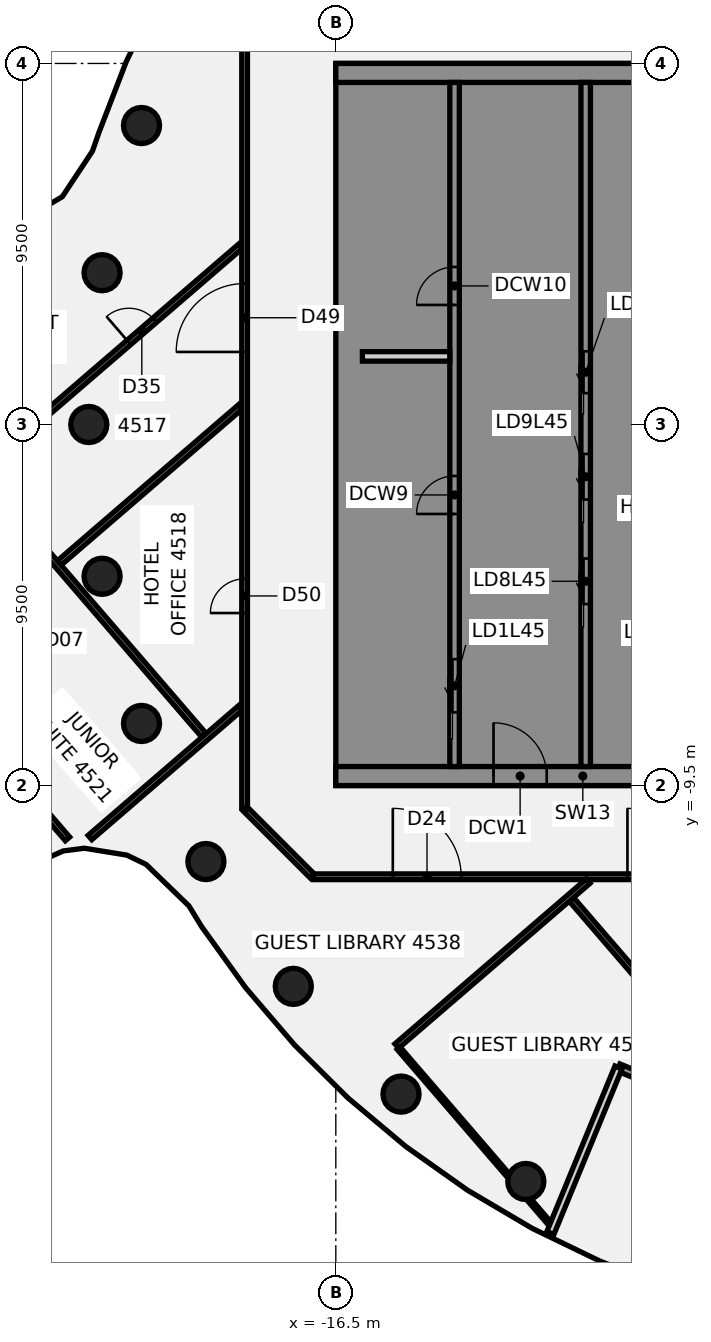
"""IFC4 building model, lengths in metres.
Left out: names, types, materials, properties, quantities, classifications, styles, units other than length and angle.
Written with IfcOpenShell. Run it as: python <this file> out.ifc"""

import sys

from ifc_helpers import new_model, si_unit, direction, frame, frame_2d, origin, origin_2d, place, context, subcontext, project, spatial, polyline, rectangle, circle, outline, extrude, element, fill, save


model = new_model("IFC4")
c1 = context("Model", 3, precision=1e-05, world=origin(), true_north=direction((0.0, 1.0)))
c2 = subcontext(c1, "Body", "Model", "MODEL_VIEW")
j1 = project(units=[si_unit("LENGTHUNIT", "METRE"), si_unit("PLANEANGLEUNIT", "RADIAN")], contexts=[c1])
p1 = place(None, origin())
s1 = spatial("IfcSite", under=j1, at=p1, CompositionType="ELEMENT")
p2 = place(p1, origin())
s2 = spatial("IfcBuilding", under=s1, at=p2, CompositionType="ELEMENT")
p3 = place(p2, frame((0.0, 0.0, 182.5)))
s3 = spatial("IfcBuildingStorey", under=s2, at=p3, CompositionType="ELEMENT", Elevation=182.5)
for number, where, z_axis, x_axis in (
    (1, (-21.613, 7.866, -0.14), (0.0, 0.0, 1.0), (1.0, 0.0, 0.0)),
    (2, (-22.651, 3.994, -0.14), (0.0, 0.0, 1.0), (1.0, 0.0, 0.0)),
    (3, (-23.0, 0.0, -0.14), (0.0, 0.0, 1.0), (1.0, 0.0, 0.0)),
    (4, (-22.651, -3.994, -0.14), (0.0, 0.0, 1.0), (1.0, 0.0, 0.0)),
    (5, (-21.613, -7.866, -0.14), (0.0, 0.0, 1.0), (1.0, 0.0, 0.0)),
    (6, (-19.919, -11.5, -0.14), (0.0, 0.0, 1.0), (1.0, 0.0, 0.0)),
    (7, (-17.619, -14.784, -0.14), (0.0, 0.0, 1.0), (1.0, 0.0, 0.0)),
    (8, (-14.784, -17.619, -0.14), (0.0, 0.0, 1.0), (1.0, 0.0, 0.0)),
    (9, (-11.5, -19.919, -0.14), (0.0, 0.0, 1.0), (1.0, 0.0, 0.0)),
):
    element("IfcColumn", number, at=place(p3, frame(where, z_axis=z_axis, x_axis=x_axis)), inside=s3, PredefinedType="COLUMN", context=c2, shape_type="SweptSolid", body=[
        extrude(circle(Radius=0.475, at=origin_2d()), origin(), (0.0, 0.0, 1.0), 3.6),
    ])
p4 = place(p3, frame((-24.698, -9.584, -0.135), z_axis=(0.048576320124, -0.013229584391, 0.998731855515), x_axis=(-0.651247732409, 0.757717932984, 0.04171240903)))
e10 = element("IfcColumn", 10, at=p4, inside=s3, PredefinedType="COLUMN", context=c2, shape_type="SweptSolid", body=[
    extrude(rectangle(XDim=0.9, YDim=0.9, at=origin_2d()), origin(), (0.0, 0.0, 1.0), 3.599),
])
p5 = place(p3, frame((-29.251, 2.595, 0.0), z_axis=(0.0, 0.0, 1.0), x_axis=(0.652713725704, -0.757604641141, 0.0)))
e11 = element("IfcWall", 11, at=p5, inside=s3, PredefinedType="PARTITIONING", context=c2, shape_type="SweptSolid", body=[
    extrude(rectangle(XDim=14.219, YDim=0.15, at=frame_2d((7.109, 0.0))), origin(), (0.0, 0.0, 1.0), 2.864),
])
p6 = place(p5, frame((5.799, 0.0, 0.0)))
e12 = element("IfcOpeningElement", 12, at=p6, cuts=e11, PredefinedType="OPENING", context=c2, shape_type="SweptSolid", body=[
    extrude(rectangle(XDim=1.4, YDim=2.1, at=frame_2d((0.7, 1.05))), frame((0.0, 0.085, 0.0), z_axis=(0.0, -1.0, 0.0), x_axis=(1.0, 0.0, 0.0)), (0.0, 0.0, 1.0), 0.17),
])
p7 = place(p3, frame((-24.299, -10.048, 0.0), z_axis=(0.0, 0.0, 1.0), x_axis=(0.652995188074, -0.75736205632, 0.0)))
e13 = element("IfcWall", 13, at=p7, inside=s3, PredefinedType="PARTITIONING", context=c2, shape_type="SweptSolid", body=[
    extrude(rectangle(XDim=1.13, YDim=0.15, at=frame_2d((0.565, 0.0))), origin(), (0.0, 0.0, 1.0), 2.864),
])
p8 = place(p3, frame((-14.847, -16.411, 0.0), z_axis=(0.0, 0.0, 1.0), x_axis=(0.652680882715, -0.757632935753, 0.0)))
e14 = element("IfcWall", 14, at=p8, inside=s3, PredefinedType="PARTITIONING", context=c2, shape_type="SweptSolid", body=[
    extrude(rectangle(XDim=4.443, YDim=0.1, at=frame_2d((2.222, 0.0))), origin(), (0.0, 0.0, 1.0), 2.864),
])
p9 = place(p3, frame((-11.425, -20.383, 0.0), z_axis=(0.0, 0.0, 1.0), x_axis=(0.652545214722, -0.757749789009, 0.0)))
e15 = element("IfcWall", 15, at=p9, inside=s3, PredefinedType="PARTITIONING", context=c2, shape_type="SweptSolid", body=[
    extrude(rectangle(XDim=0.882, YDim=0.1, at=frame_2d((0.441, 0.0))), origin(), (0.0, 0.0, 1.0), 2.864),
])
p10 = place(p3, frame((-10.298, -12.499, 0.0), z_axis=(0.0, 0.0, 1.0), x_axis=(0.652713185698, -0.757605106382, 0.0)))
e16 = element("IfcWall", 16, at=p10, inside=s3, PredefinedType="PARTITIONING", context=c2, shape_type="SweptSolid", body=[
    extrude(rectangle(XDim=17.62, YDim=0.15, at=frame_2d((8.81, 0.0))), origin(), (0.0, 0.0, 1.0), 2.864),
])
p11 = place(p10, frame((8.22, 0.0, 0.0)))
e17 = element("IfcOpeningElement", 17, at=p11, cuts=e16, PredefinedType="OPENING", context=c2, shape_type="SweptSolid", body=[
    extrude(rectangle(XDim=1.8, YDim=2.1, at=frame_2d((0.9, 1.05))), frame((0.0, 0.085, 0.0), z_axis=(0.0, -1.0, 0.0), x_axis=(1.0, 0.0, 0.0)), (0.0, 0.0, 1.0), 0.17),
])
p12 = place(p3, frame((-18.872, -10.128, 0.0), z_axis=(0.0, 0.0, 1.0), x_axis=(0.707106781187, -0.707106781187, 0.0)))
e18 = element("IfcWall", 18, at=p12, inside=s3, PredefinedType="PARTITIONING", context=c2, shape_type="SweptSolid", body=[
    extrude(rectangle(XDim=2.465, YDim=0.15, at=frame_2d((1.232, 0.0))), origin(), (0.0, 0.0, 1.0), 2.864),
])
p13 = place(p3, frame((-17.1, -11.9, 0.0), z_axis=(0.0, 0.0, 1.0), x_axis=(1.0, 0.0, 0.0)))
e19 = element("IfcWall", 19, at=p13, inside=s3, PredefinedType="PARTITIONING", context=c2, shape_type="SweptSolid", body=[
    extrude(rectangle(XDim=34.165, YDim=0.15, at=frame_2d((17.083, 0.0))), origin(), (0.0, 0.0, 1.0), 2.864),
])
p14 = place(p13, frame((8.274, 0.0, 0.0)))
e20 = element("IfcOpeningElement", 20, at=p14, cuts=e19, PredefinedType="OPENING", context=c2, shape_type="SweptSolid", body=[
    extrude(rectangle(XDim=1.8, YDim=2.1, at=frame_2d((0.9, 1.05))), frame((0.0, 0.085, 0.0), z_axis=(0.0, -1.0, 0.0), x_axis=(1.0, 0.0, 0.0)), (0.0, 0.0, 1.0), 0.17),
])
p15 = place(p13, frame((2.1, 0.0, 0.0)))
e21 = element("IfcOpeningElement", 21, at=p15, cuts=e19, PredefinedType="OPENING", context=c2, shape_type="SweptSolid", body=[
    extrude(rectangle(XDim=1.8, YDim=2.1, at=frame_2d((0.9, 1.05))), frame((0.0, 0.085, 0.0), z_axis=(0.0, -1.0, 0.0), x_axis=(1.0, 0.0, 0.0)), (0.0, 0.0, 1.0), 0.17),
])
p16 = place(p13, frame((25.33, 0.0, 0.0)))
e22 = element("IfcOpeningElement", 22, at=p16, cuts=e19, PredefinedType="OPENING", context=c2, shape_type="SweptSolid", body=[
    extrude(rectangle(XDim=1.8, YDim=2.1, at=frame_2d((0.9, 1.05))), frame((0.0, 0.085, 0.0), z_axis=(0.0, -1.0, 0.0), x_axis=(1.0, 0.0, 0.0)), (0.0, 0.0, 1.0), 0.17),
])
p17 = place(p3, frame((-25.862, -1.216, 0.0), z_axis=(0.0, 0.0, 1.0), x_axis=(0.757576468923, 0.652746423762, 0.0)))
e23 = element("IfcWall", 23, at=p17, inside=s3, PredefinedType="PARTITIONING", context=c2, shape_type="SweptSolid", body=[
    extrude(rectangle(XDim=9.05, YDim=0.15, at=frame_2d((4.525, 0.0))), origin(), (0.0, 0.0, 1.0), 2.864),
])
p18 = place(p17, frame((5.17, 0.0, 0.0)))
e24 = element("IfcOpeningElement", 24, at=p18, cuts=e23, PredefinedType="OPENING", context=c2, shape_type="SweptSolid", body=[
    extrude(rectangle(XDim=0.9, YDim=2.1, at=frame_2d((0.45, 1.05))), frame((0.0, 0.085, 0.0), z_axis=(0.0, -1.0, 0.0), x_axis=(1.0, 0.0, 0.0)), (0.0, 0.0, 1.0), 0.17),
])
p19 = place(p3, frame((-23.774, -3.641, 0.0), z_axis=(0.0, 0.0, 1.0), x_axis=(0.757583902186, 0.65273779663, 0.0)))
e25 = element("IfcWall", 25, at=p19, inside=s3, PredefinedType="PARTITIONING", context=c2, shape_type="SweptSolid", body=[
    extrude(rectangle(XDim=6.294, YDim=0.15, at=frame_2d((3.147, 0.0))), origin(), (0.0, 0.0, 1.0), 2.864),
])
p20 = place(p3, frame((-22.97, -10.868, 0.0), z_axis=(0.0, 0.0, 1.0), x_axis=(0.75753804944, 0.6527910107, 0.0)))
e26 = element("IfcWall", 26, at=p20, inside=s3, PredefinedType="PARTITIONING", context=c2, shape_type="SweptSolid", body=[
    extrude(rectangle(XDim=5.233, YDim=0.15, at=frame_2d((2.616, 0.0))), origin(), (0.0, 0.0, 1.0), 2.864),
])
p21 = place(p3, frame((-14.896, -16.354, 0.0), z_axis=(0.0, 0.0, 1.0), x_axis=(0.757644724188, 0.652667198432, 0.0)))
e27 = element("IfcWall", 27, at=p21, inside=s3, PredefinedType="PARTITIONING", context=c2, shape_type="SweptSolid", body=[
    extrude(rectangle(XDim=6.649, YDim=0.15, at=frame_2d((3.324, 0.0))), origin(), (0.0, 0.0, 1.0), 2.864),
])
p22 = place(p3, frame((-18.9, -10.1, 0.0), z_axis=(0.0, 0.0, 1.0), x_axis=(0.0, 1.0, 0.0)))
e28 = element("IfcWall", 28, at=p22, inside=s3, PredefinedType="PARTITIONING", context=c2, shape_type="SweptSolid", body=[
    extrude(rectangle(XDim=20.2, YDim=0.15, at=frame_2d((10.1, 0.0))), origin(), (0.0, 0.0, 1.0), 2.864),
])
p23 = place(p22, frame((12.009, 0.0, 0.0)))
e29 = element("IfcOpeningElement", 29, at=p23, cuts=e28, PredefinedType="OPENING", context=c2, shape_type="SweptSolid", body=[
    extrude(rectangle(XDim=1.8, YDim=2.1, at=frame_2d((0.9, 1.05))), frame((0.0, 0.085, 0.0), z_axis=(0.0, -1.0, 0.0), x_axis=(1.0, 0.0, 0.0)), (0.0, 0.0, 1.0), 0.17),
])
p24 = place(p22, frame((5.139, 0.0, 0.0)))
e30 = element("IfcOpeningElement", 30, at=p24, cuts=e28, PredefinedType="OPENING", context=c2, shape_type="SweptSolid", body=[
    extrude(rectangle(XDim=0.9, YDim=2.1, at=frame_2d((0.45, 1.05))), frame((0.0, 0.085, 0.0), z_axis=(0.0, -1.0, 0.0), x_axis=(1.0, 0.0, 0.0)), (0.0, 0.0, 1.0), 0.17),
])
p25 = place(p3, frame((-9.062, -16.918, 0.0), z_axis=(0.0, 0.0, 1.0), x_axis=(0.924739730044, -0.380600094164, 0.0)))
e31 = element("IfcWall", 31, at=p25, inside=s3, PredefinedType="SOLIDWALL", context=c2, shape_type="SweptSolid", body=[
    extrude(rectangle(XDim=4.347, YDim=0.2, at=frame_2d((2.174, 0.0))), origin(), (0.0, 0.0, 1.0), 3.46),
])
p26 = place(p25, frame((1.273, 0.0, 0.0)))
e32 = element("IfcOpeningElement", 32, at=p26, cuts=e31, PredefinedType="OPENING", context=c2, shape_type="SweptSolid", body=[
    extrude(rectangle(XDim=1.8, YDim=2.4, at=frame_2d((0.9, 1.2))), frame((0.0, 0.11, 0.0), z_axis=(0.0, -1.0, 0.0), x_axis=(1.0, 0.0, 0.0)), (0.0, 0.0, 1.0), 0.22),
])
p27 = place(p3, frame((-9.062, -16.918, 0.0), z_axis=(0.0, 0.0, 1.0), x_axis=(-0.380580288667, -0.924747881251, 0.0)))
e33 = element("IfcWall", 33, at=p27, inside=s3, PredefinedType="SOLIDWALL", context=c2, shape_type="SweptSolid", body=[
    extrude(rectangle(XDim=4.708, YDim=0.2, at=frame_2d((2.354, 0.0))), origin(), (0.0, 0.0, 1.0), 3.46),
])
p28 = place(p3, frame((-16.5, -9.25, 0.0), z_axis=(0.0, 0.0, 1.0), x_axis=(1.0, 0.0, 0.0)))
e34 = element("IfcWall", 34, at=p28, inside=s3, PredefinedType="SHEAR", context=c2, shape_type="SweptSolid", body=[
    extrude(rectangle(XDim=13.0, YDim=0.5, at=frame_2d((6.5, 0.0))), origin(), (0.0, 0.0, 1.0), 3.46),
])
p29 = place(p28, frame((4.15, 0.0, 0.0)))
e35 = element("IfcOpeningElement", 35, at=p29, cuts=e34, PredefinedType="OPENING", context=c2, shape_type="SweptSolid", body=[
    extrude(rectangle(XDim=1.4, YDim=2.1, at=frame_2d((0.7, 1.05))), frame((0.0, 0.26, 0.0), z_axis=(0.0, -1.0, 0.0), x_axis=(1.0, 0.0, 0.0)), (0.0, 0.0, 1.0), 0.52),
])
p30 = place(p28, frame((10.125, 0.0, 0.0)))
e36 = element("IfcOpeningElement", 36, at=p30, cuts=e34, PredefinedType="OPENING", context=c2, shape_type="SweptSolid", body=[
    extrude(rectangle(XDim=1.4, YDim=2.1, at=frame_2d((0.7, 1.05))), frame((0.0, 0.26, 0.0), z_axis=(0.0, -1.0, 0.0), x_axis=(1.0, 0.0, 0.0)), (0.0, 0.0, 1.0), 0.52),
])
p31 = place(p3, origin())
e37 = element("IfcWall", 37, at=p31, inside=s3, PredefinedType="SHEAR", context=c2, shape_type="SweptSolid", body=[
    extrude(outline(polyline([(-13.5, -8.125), (-16.0, -8.125), (-16.0, -5.625), (-13.5, -5.625), (-13.5, -5.375), (-16.0, -5.375), (-16.0, 5.375), (-13.5, 5.375), (-13.5, 5.625), (-16.0, 5.625), (-16.0, 8.125), (-13.5, 8.125), (-13.5, 9.0), (-16.0, 9.0), (-16.5, 9.0), (-16.5, -9.0), (-16.0, -9.0), (-13.5, -9.0), (-13.5, -8.125)])), origin(), (0.0, 0.0, 1.0), 3.46),
])
p32 = place(p3, frame((-16.5, 9.25, 0.0), z_axis=(0.0, 0.0, 1.0), x_axis=(1.0, 0.0, 0.0)))
e38 = element("IfcWall", 38, at=p32, inside=s3, PredefinedType="SHEAR", context=c2, shape_type="SweptSolid", body=[
    extrude(rectangle(XDim=13.0, YDim=0.5, at=frame_2d((6.5, 0.0))), origin(), (0.0, 0.0, 1.0), 3.46),
])
p33 = place(p3, origin())
e39 = element("IfcWall", 39, at=p33, inside=s3, PredefinedType="SHEAR", context=c2, shape_type="SweptSolid", body=[
    extrude(outline(polyline([(-9.8, -5.375), (-9.8, -5.625), (-7.5, -5.625), (-7.25, -5.625), (-7.25, 9.0), (-7.5, 9.0), (-9.8, 9.0), (-9.8, 8.125), (-7.5, 8.125), (-7.5, 5.625), (-9.8, 5.625), (-9.8, 5.375), (-7.5, 5.375), (-7.5, 2.875), (-9.8, 2.875), (-9.8, 2.625), (-7.5, 2.625), (-7.5, 0.125), (-9.8, 0.125), (-9.8, -0.125), (-7.5, -0.125), (-7.5, -2.625), (-9.8, -2.625), (-9.8, -2.875), (-7.5, -2.875), (-7.5, -5.375), (-9.8, -5.375)])), origin(), (0.0, 0.0, 1.0), 3.46),
])
p34 = place(p3, origin())
e40 = element("IfcWall", 40, at=p34, inside=s3, PredefinedType="SHEAR", context=c2, shape_type="SweptSolid", body=[
    extrude(outline(polyline([(-7.5, -8.125), (-9.55, -8.125), (-9.55, -5.625), (-9.8, -5.625), (-9.8, -8.125), (-9.8, -9.0), (-7.5, -9.0), (-7.5, -8.125)])), origin(), (0.0, 0.0, 1.0), 3.46),
])
p35 = place(p3, frame((-13.375, -9.0, 0.0), z_axis=(0.0, 0.0, 1.0), x_axis=(0.0, 1.0, 0.0)))
e41 = element("IfcWall", 41, at=p35, inside=s3, PredefinedType="SHEAR", context=c2, shape_type="SweptSolid", body=[
    extrude(rectangle(XDim=18.0, YDim=0.25, at=frame_2d((9.0, 0.0))), origin(), (0.0, 0.0, 1.0), 3.46),
])
p36 = place(p35, frame((1.425, 0.0, 0.0)))
e42 = element("IfcOpeningElement", 42, at=p36, cuts=e41, PredefinedType="OPENING", context=c2, shape_type="SweptSolid", body=[
    extrude(rectangle(XDim=1.4, YDim=2.1, at=frame_2d((0.7, 1.05))), frame((0.0, 0.135, 0.0), z_axis=(0.0, -1.0, 0.0), x_axis=(1.0, 0.0, 0.0)), (0.0, 0.0, 1.0), 0.27),
])
p37 = place(p35, frame((6.646, 0.0, 0.0)))
e43 = element("IfcOpeningElement", 43, at=p37, cuts=e41, PredefinedType="OPENING", context=c2, shape_type="SweptSolid", body=[
    extrude(rectangle(XDim=1.0, YDim=2.1, at=frame_2d((0.5, 1.05))), frame((0.0, 0.135, 0.0), z_axis=(0.0, -1.0, 0.0), x_axis=(1.0, 0.0, 0.0)), (0.0, 0.0, 1.0), 0.27),
])
p38 = place(p35, frame((12.146, 0.0, 0.0)))
e44 = element("IfcOpeningElement", 44, at=p38, cuts=e41, PredefinedType="OPENING", context=c2, shape_type="SweptSolid", body=[
    extrude(rectangle(XDim=1.0, YDim=2.1, at=frame_2d((0.5, 1.05))), frame((0.0, 0.135, 0.0), z_axis=(0.0, -1.0, 0.0), x_axis=(1.0, 0.0, 0.0)), (0.0, 0.0, 1.0), 0.27),
])
p39 = place(p3, frame((-9.925, -9.0, 0.0), z_axis=(0.0, 0.0, 1.0), x_axis=(0.0, 1.0, 0.0)))
e45 = element("IfcWall", 45, at=p39, inside=s3, PredefinedType="SHEAR", context=c2, shape_type="SweptSolid", body=[
    extrude(rectangle(XDim=18.0, YDim=0.25, at=frame_2d((9.0, 0.0))), origin(), (0.0, 0.0, 1.0), 3.46),
])
p40 = place(p39, frame((4.275, 0.0, 0.0)))
e46 = element("IfcOpeningElement", 46, at=p40, cuts=e45, PredefinedType="OPENING", context=c2, shape_type="SweptSolid", body=[
    extrude(rectangle(XDim=1.2, YDim=2.1, at=frame_2d((0.6, 1.05))), frame((0.0, 0.135, 0.0), z_axis=(0.0, -1.0, 0.0), x_axis=(1.0, 0.0, 0.0)), (0.0, 0.0, 1.0), 0.27),
])
p41 = place(p39, frame((7.025, 0.0, 0.0)))
e47 = element("IfcOpeningElement", 47, at=p41, cuts=e45, PredefinedType="OPENING", context=c2, shape_type="SweptSolid", body=[
    extrude(rectangle(XDim=1.2, YDim=2.1, at=frame_2d((0.6, 1.05))), frame((0.0, 0.135, 0.0), z_axis=(0.0, -1.0, 0.0), x_axis=(1.0, 0.0, 0.0)), (0.0, 0.0, 1.0), 0.27),
])
p42 = place(p39, frame((9.825, 0.0, 0.0)))
e48 = element("IfcOpeningElement", 48, at=p42, cuts=e45, PredefinedType="OPENING", context=c2, shape_type="SweptSolid", body=[
    extrude(rectangle(XDim=1.1, YDim=2.1, at=frame_2d((0.55, 1.05))), frame((0.0, 0.135, 0.0), z_axis=(0.0, -1.0, 0.0), x_axis=(1.0, 0.0, 0.0)), (0.0, 0.0, 1.0), 0.27),
])
p43 = place(p3, frame((-15.8, 1.792, 0.0), z_axis=(0.0, 0.0, 1.0), x_axis=(1.0, 0.0, 0.0)))
e49 = element("IfcWall", 49, at=p43, inside=s3, PredefinedType="PARTITIONING", context=c2, shape_type="SweptSolid", body=[
    extrude(rectangle(XDim=2.3, YDim=0.25, at=frame_2d((1.15, 0.0))), origin(), (0.0, 0.0, 1.0), 3.46),
])
p44 = place(p14, origin())
e50 = element("IfcDoor", 50, at=p44, inside=s3, OperationType="DOUBLE_DOOR_SINGLE_SWING", PredefinedType="DOOR", context=c2, shape_type="SweptSolid", body=[
    extrude(rectangle(XDim=1.8, YDim=2.1, at=frame_2d((0.9, 1.05))), frame((0.0, 0.025, 0.0), z_axis=(0.0, -1.0, 0.0), x_axis=(1.0, 0.0, 0.0)), (0.0, 0.0, 1.0), 0.05),
])
fill(e20, e50)
p45 = place(p15, frame((1.8, 0.0, 0.0), z_axis=(0.0, 0.0, 1.0), x_axis=(-1.0, 0.0, 0.0)))
e51 = element("IfcDoor", 51, at=p45, inside=s3, OperationType="DOUBLE_DOOR_SINGLE_SWING", PredefinedType="DOOR", context=c2, shape_type="SweptSolid", body=[
    extrude(rectangle(XDim=1.8, YDim=2.1, at=frame_2d((0.9, 1.05))), frame((0.0, 0.025, 0.0), z_axis=(0.0, -1.0, 0.0), x_axis=(1.0, 0.0, 0.0)), (0.0, 0.0, 1.0), 0.05),
])
fill(e21, e51)
p46 = place(p18, origin())
e52 = element("IfcDoor", 52, at=p46, inside=s3, OperationType="SINGLE_SWING_LEFT", PredefinedType="DOOR", context=c2, shape_type="SweptSolid", body=[
    extrude(rectangle(XDim=0.9, YDim=2.1, at=frame_2d((0.45, 1.05))), frame((0.0, 0.025, 0.0), z_axis=(0.0, -1.0, 0.0), x_axis=(1.0, 0.0, 0.0)), (0.0, 0.0, 1.0), 0.05),
])
fill(e24, e52)
p47 = place(p23, frame((1.8, 0.0, 0.0), z_axis=(0.0, 0.0, 1.0), x_axis=(-1.0, 0.0, 0.0)))
e53 = element("IfcDoor", 53, at=p47, inside=s3, OperationType="DOUBLE_DOOR_SINGLE_SWING", PredefinedType="DOOR", context=c2, shape_type="SweptSolid", body=[
    extrude(rectangle(XDim=1.8, YDim=2.1, at=frame_2d((0.9, 1.05))), frame((0.0, 0.025, 0.0), z_axis=(0.0, -1.0, 0.0), x_axis=(1.0, 0.0, 0.0)), (0.0, 0.0, 1.0), 0.05),
])
fill(e29, e53)
p48 = place(p24, origin())
e54 = element("IfcDoor", 54, at=p48, inside=s3, OperationType="SINGLE_SWING_RIGHT", PredefinedType="DOOR", context=c2, shape_type="SweptSolid", body=[
    extrude(rectangle(XDim=0.9, YDim=2.1, at=frame_2d((0.45, 1.05))), frame((0.0, 0.025, 0.0), z_axis=(0.0, -1.0, 0.0), x_axis=(1.0, 0.0, 0.0)), (0.0, 0.0, 1.0), 0.05),
])
fill(e30, e54)
p49 = place(p29, origin())
e55 = element("IfcDoor", 55, at=p49, inside=s3, OperationType="SINGLE_SWING_LEFT", PredefinedType="DOOR", context=c2, shape_type="SweptSolid", body=[
    extrude(rectangle(XDim=1.4, YDim=2.1, at=frame_2d((0.7, 1.05))), frame((0.0, 0.025, 0.0), z_axis=(0.0, -1.0, 0.0), x_axis=(1.0, 0.0, 0.0)), (0.0, 0.0, 1.0), 0.05),
])
fill(e35, e55)
p50 = place(p36, origin())
e56 = element("IfcDoor", 56, at=p50, inside=s3, OperationType="SLIDING_TO_LEFT", PredefinedType="DOOR", context=c2, shape_type="SweptSolid", body=[
    extrude(rectangle(XDim=1.4, YDim=2.1, at=frame_2d((0.7, 1.05))), frame((0.0, 0.025, 0.0), z_axis=(0.0, -1.0, 0.0), x_axis=(1.0, 0.0, 0.0)), (0.0, 0.0, 1.0), 0.05),
])
fill(e42, e56)
p51 = place(p40, origin())
e57 = element("IfcDoor", 57, at=p51, inside=s3, OperationType="SLIDING_TO_LEFT", PredefinedType="DOOR", context=c2, shape_type="SweptSolid", body=[
    extrude(rectangle(XDim=1.2, YDim=2.1, at=frame_2d((0.6, 1.05))), frame((0.0, 0.025, 0.0), z_axis=(0.0, -1.0, 0.0), x_axis=(1.0, 0.0, 0.0)), (0.0, 0.0, 1.0), 0.05),
])
fill(e46, e57)
p52 = place(p41, origin())
e58 = element("IfcDoor", 58, at=p52, inside=s3, OperationType="SLIDING_TO_LEFT", PredefinedType="DOOR", context=c2, shape_type="SweptSolid", body=[
    extrude(rectangle(XDim=1.2, YDim=2.1, at=frame_2d((0.6, 1.05))), frame((0.0, 0.025, 0.0), z_axis=(0.0, -1.0, 0.0), x_axis=(1.0, 0.0, 0.0)), (0.0, 0.0, 1.0), 0.05),
])
fill(e47, e58)
p53 = place(p42, origin())
e59 = element("IfcDoor", 59, at=p53, inside=s3, OperationType="SLIDING_TO_LEFT", PredefinedType="DOOR", context=c2, shape_type="SweptSolid", body=[
    extrude(rectangle(XDim=1.1, YDim=2.1, at=frame_2d((0.55, 1.05))), frame((0.0, 0.025, 0.0), z_axis=(0.0, -1.0, 0.0), x_axis=(1.0, 0.0, 0.0)), (0.0, 0.0, 1.0), 0.05),
])
fill(e48, e59)
p54 = place(p37, origin())
e60 = element("IfcDoor", 60, at=p54, inside=s3, OperationType="SINGLE_SWING_LEFT", PredefinedType="DOOR", context=c2, shape_type="SweptSolid", body=[
    extrude(rectangle(XDim=1.0, YDim=2.1, at=frame_2d((0.5, 1.05))), frame((0.0, 0.025, 0.0), z_axis=(0.0, -1.0, 0.0), x_axis=(1.0, 0.0, 0.0)), (0.0, 0.0, 1.0), 0.05),
])
fill(e43, e60)
p55 = place(p38, origin())
e61 = element("IfcDoor", 61, at=p55, inside=s3, OperationType="SINGLE_SWING_LEFT", PredefinedType="DOOR", context=c2, shape_type="SweptSolid", body=[
    extrude(rectangle(XDim=1.0, YDim=2.1, at=frame_2d((0.5, 1.05))), frame((0.0, 0.025, 0.0), z_axis=(0.0, -1.0, 0.0), x_axis=(1.0, 0.0, 0.0)), (0.0, 0.0, 1.0), 0.05),
])
fill(e44, e61)
save(model, sys.argv[1])
